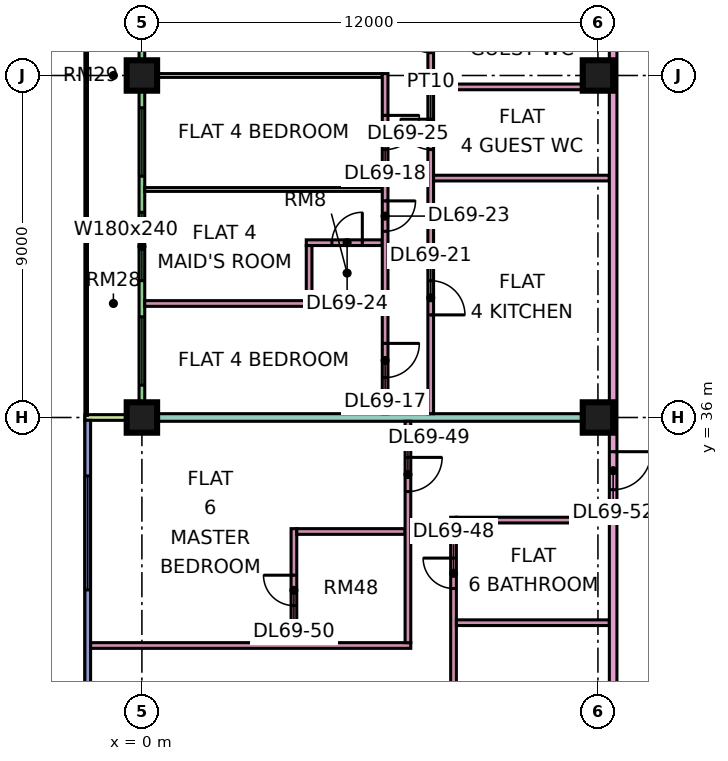
"""IFC4 building model, lengths in metres.
Left out: names, types, materials, properties, quantities, classifications, styles, units other than length and angle.
Written with IfcOpenShell. Run it as: python <this file> out.ifc"""

import sys

from ifc_helpers import new_model, si_unit, direction, frame, frame_2d, origin, origin_2d, place, context, subcontext, project, spatial, rectangle, extrude, element, fill, save


model = new_model("IFC4")
c1 = context("Model", 3, precision=1e-05, world=origin(), true_north=direction((0.0, 1.0)))
c2 = subcontext(c1, "Body", "Model", "MODEL_VIEW")
j1 = project(units=[si_unit("LENGTHUNIT", "METRE"), si_unit("PLANEANGLEUNIT", "RADIAN")], contexts=[c1])
p1 = place(None, origin())
s1 = spatial("IfcSite", under=j1, at=p1, CompositionType="ELEMENT")
p2 = place(p1, origin())
s2 = spatial("IfcBuilding", under=s1, at=p2, CompositionType="ELEMENT")
p3 = place(p2, frame((0.0, 0.0, 295.9)))
s3 = spatial("IfcBuildingStorey", under=s2, at=p3, CompositionType="ELEMENT", Elevation=295.9)
p4 = place(p3, frame((0.0, 36.0, 0.0), z_axis=(0.0, 0.0, 1.0), x_axis=(1.0, 0.0, 0.0)))
e1 = element("IfcColumn", 1, at=p4, inside=s3, PredefinedType="COLUMN", context=c2, shape_type="SweptSolid", body=[
    extrude(rectangle(XDim=0.8, YDim=0.8, at=origin_2d()), origin(), (0.0, 0.0, 1.0), 3.75),
])
for number, where, z_axis, x_axis in (
    (2, (0.0, 45.0, 0.0), (0.0, 0.0, 1.0), (1.0, 0.0, 0.0)),
    (3, (12.0, 36.0, 0.0), (0.0, 0.0, 1.0), (1.0, 0.0, 0.0)),
    (4, (12.0, 45.0, 0.0), (0.0, 0.0, 1.0), (1.0, 0.0, 0.0)),
):
    element("IfcColumn", number, at=place(p3, frame(where, z_axis=z_axis, x_axis=x_axis)), inside=s3, PredefinedType="COLUMN", context=c2, shape_type="SweptSolid", body=[
        extrude(rectangle(XDim=0.8, YDim=0.8, at=origin_2d()), origin(), (0.0, 0.0, 1.0), 3.75),
    ])
p5 = place(p3, frame((0.0, 47.925, 0.0), z_axis=(0.0, 0.0, 1.0), x_axis=(0.0, -1.0, 0.0)))
e5 = element("IfcWall", 5, at=p5, inside=s3, PredefinedType="SOLIDWALL", context=c2, shape_type="SweptSolid", body=[
    extrude(rectangle(XDim=11.85, YDim=0.15, at=frame_2d((5.925, 0.0))), origin(), (0.0, 0.0, 1.0), 3.35),
])
p6 = place(p5, frame((0.613, 0.0, 0.0)))
e6 = element("IfcOpeningElement", 6, at=p6, cuts=e5, PredefinedType="OPENING", context=c2, shape_type="SweptSolid", body=[
    extrude(rectangle(XDim=1.2, YDim=2.4, at=frame_2d((0.6, 1.2))), frame((0.0, 0.085, 0.0), z_axis=(0.0, -1.0, 0.0), x_axis=(1.0, 0.0, 0.0)), (0.0, 0.0, 1.0), 0.17),
])
p7 = place(p5, frame((3.775, 0.0, 0.45)))
e7 = element("IfcOpeningElement", 7, at=p7, cuts=e5, PredefinedType="OPENING", context=c2, shape_type="SweptSolid", body=[
    extrude(rectangle(XDim=1.8, YDim=2.4, at=frame_2d((0.9, 1.2))), frame((0.0, 0.085, 0.0), z_axis=(0.0, -1.0, 0.0), x_axis=(1.0, 0.0, 0.0)), (0.0, 0.0, 1.0), 0.17),
])
p8 = place(p5, frame((6.525, 0.0, 0.45)))
e8 = element("IfcOpeningElement", 8, at=p8, cuts=e5, PredefinedType="OPENING", context=c2, shape_type="SweptSolid", body=[
    extrude(rectangle(XDim=1.8, YDim=2.4, at=frame_2d((0.9, 1.2))), frame((0.0, 0.085, 0.0), z_axis=(0.0, -1.0, 0.0), x_axis=(1.0, 0.0, 0.0)), (0.0, 0.0, 1.0), 0.17),
])
p9 = place(p5, frame((9.275, 0.0, 0.45)))
e9 = element("IfcOpeningElement", 9, at=p9, cuts=e5, PredefinedType="OPENING", context=c2, shape_type="SweptSolid", body=[
    extrude(rectangle(XDim=1.8, YDim=2.4, at=frame_2d((0.9, 1.2))), frame((0.0, 0.085, 0.0), z_axis=(0.0, -1.0, 0.0), x_axis=(1.0, 0.0, 0.0)), (0.0, 0.0, 1.0), 0.17),
])
p10 = place(p3, frame((-1.5, 36.0, 0.0), z_axis=(0.0, 0.0, 1.0), x_axis=(1.0, 0.0, 0.0)))
e10 = element("IfcWall", 10, at=p10, inside=s3, PredefinedType="SOLIDWALL", context=c2, shape_type="SweptSolid", body=[
    extrude(rectangle(XDim=1.5, YDim=0.15, at=frame_2d((0.75, 0.0))), origin(), (0.0, 0.0, 1.0), 3.35),
])
p11 = place(p3, frame((-1.425, 35.925, 0.0), z_axis=(0.0, 0.0, 1.0), x_axis=(0.0, -1.0, 0.0)))
e11 = element("IfcWall", 11, at=p11, inside=s3, PredefinedType="SOLIDWALL", context=c2, shape_type="SweptSolid", body=[
    extrude(rectangle(XDim=11.85, YDim=0.15, at=frame_2d((5.925, 0.0))), origin(), (0.0, 0.0, 1.0), 3.35),
])
p12 = place(p11, frame((1.462, 0.0, 0.45)))
e12 = element("IfcOpeningElement", 12, at=p12, cuts=e11, PredefinedType="OPENING", context=c2, shape_type="SweptSolid", body=[
    extrude(rectangle(XDim=3.0, YDim=2.4, at=frame_2d((1.5, 1.2))), frame((0.0, 0.085, 0.0), z_axis=(0.0, -1.0, 0.0), x_axis=(1.0, 0.0, 0.0)), (0.0, 0.0, 1.0), 0.17),
])
p13 = place(p11, frame((7.387, 0.0, 0.45)))
e13 = element("IfcOpeningElement", 13, at=p13, cuts=e11, PredefinedType="OPENING", context=c2, shape_type="SweptSolid", body=[
    extrude(rectangle(XDim=3.0, YDim=2.4, at=frame_2d((1.5, 1.2))), frame((0.0, 0.085, 0.0), z_axis=(0.0, -1.0, 0.0), x_axis=(1.0, 0.0, 0.0)), (0.0, 0.0, 1.0), 0.17),
])
p14 = place(p3, frame((-1.35, 30.0, 0.0), z_axis=(0.0, 0.0, 1.0), x_axis=(1.0, 0.0, 0.0)))
e14 = element("IfcWall", 14, at=p14, inside=s3, PredefinedType="PARTITIONING", context=c2, shape_type="SweptSolid", body=[
    extrude(rectangle(XDim=8.425, YDim=0.15, at=frame_2d((4.212, 0.0))), origin(), (0.0, 0.0, 1.0), 3.35),
])
e15 = element("IfcWall", 15, at=p4, inside=s3, PredefinedType="PARTITIONING", context=c2, shape_type="SweptSolid", body=[
    extrude(rectangle(XDim=12.3, YDim=0.2, at=frame_2d((6.15, 0.0))), origin(), (0.0, 0.0, 1.0), 3.35),
])
p15 = place(p3, frame((0.074, 39.0, 0.0), z_axis=(0.0, 0.0, 1.0), x_axis=(1.0, 0.0, 0.0)))
e16 = element("IfcWall", 16, at=p15, inside=s3, PredefinedType="PARTITIONING", context=c2, shape_type="SweptSolid", body=[
    extrude(rectangle(XDim=6.251, YDim=0.15, at=frame_2d((3.125, 0.0))), origin(), (0.0, 0.0, 1.0), 3.35),
])
for number, where, z_axis, x_axis in (
    (17, (0.074, 42.0, 0.0), (0.0, 0.0, 1.0), (1.0, 0.0, 0.0)),
    (18, (0.074, 45.0, 0.0), (0.0, 0.0, 1.0), (1.0, 0.0, 0.0)),
):
    element("IfcWall", number, at=place(p3, frame(where, z_axis=z_axis, x_axis=x_axis)), inside=s3, PredefinedType="PARTITIONING", context=c2, shape_type="SweptSolid", body=[
        extrude(rectangle(XDim=6.251, YDim=0.1, at=frame_2d((3.125, 0.0))), origin(), (0.0, 0.0, 1.0), 3.35),
    ])
p16 = place(p3, frame((4.0, 30.075, 0.0), z_axis=(0.0, 0.0, 1.0), x_axis=(0.0, 1.0, 0.0)))
e19 = element("IfcWall", 19, at=p16, inside=s3, PredefinedType="PARTITIONING", context=c2, shape_type="SweptSolid", body=[
    extrude(rectangle(XDim=3.0, YDim=0.15, at=frame_2d((1.5, 0.0))), origin(), (0.0, 0.0, 1.0), 3.35),
])
p17 = place(p16, frame((0.975, 0.0, 0.0)))
e20 = element("IfcOpeningElement", 20, at=p17, cuts=e19, PredefinedType="OPENING", context=c2, shape_type="SweptSolid", body=[
    extrude(rectangle(XDim=0.8, YDim=2.1, at=frame_2d((0.4, 1.05))), frame((0.0, 0.085, 0.0), z_axis=(0.0, -1.0, 0.0), x_axis=(1.0, 0.0, 0.0)), (0.0, 0.0, 1.0), 0.17),
])
p18 = place(p3, frame((4.075, 33.0, 0.0), z_axis=(0.0, 0.0, 1.0), x_axis=(1.0, 0.0, 0.0)))
e21 = element("IfcWall", 21, at=p18, inside=s3, PredefinedType="PARTITIONING", context=c2, shape_type="SweptSolid", body=[
    extrude(rectangle(XDim=2.85, YDim=0.15, at=frame_2d((1.425, 0.0))), origin(), (0.0, 0.0, 1.0), 3.35),
])
p19 = place(p3, frame((4.325, 40.6, 0.0), z_axis=(0.0, 0.0, 1.0), x_axis=(1.0, 0.0, 0.0)))
e22 = element("IfcWall", 22, at=p19, inside=s3, PredefinedType="PARTITIONING", context=c2, shape_type="SweptSolid", body=[
    extrude(rectangle(XDim=2.0, YDim=0.15, at=frame_2d((1.0, 0.0))), origin(), (0.0, 0.0, 1.0), 3.35),
])
p20 = place(p19, frame((0.675, 0.0, 0.0)))
e23 = element("IfcOpeningElement", 23, at=p20, cuts=e22, PredefinedType="OPENING", context=c2, shape_type="SweptSolid", body=[
    extrude(rectangle(XDim=0.8, YDim=2.1, at=frame_2d((0.4, 1.05))), frame((0.0, 0.085, 0.0), z_axis=(0.0, -1.0, 0.0), x_axis=(1.0, 0.0, 0.0)), (0.0, 0.0, 1.0), 0.17),
])
p21 = place(p3, frame((4.4, 39.075, 0.0), z_axis=(0.0, 0.0, 1.0), x_axis=(0.0, 1.0, 0.0)))
e24 = element("IfcWall", 24, at=p21, inside=s3, PredefinedType="PARTITIONING", context=c2, shape_type="SweptSolid", body=[
    extrude(rectangle(XDim=1.45, YDim=0.15, at=frame_2d((0.725, 0.0))), origin(), (0.0, 0.0, 1.0), 3.35),
])
p22 = place(p3, frame((6.4, 36.1, 0.0), z_axis=(0.0, 0.0, 1.0), x_axis=(0.0, 1.0, 0.0)))
e25 = element("IfcWall", 25, at=p22, inside=s3, PredefinedType="PARTITIONING", context=c2, shape_type="SweptSolid", body=[
    extrude(rectangle(XDim=8.95, YDim=0.15, at=frame_2d((4.475, 0.0))), origin(), (0.0, 0.0, 1.0), 3.35),
])
p23 = place(p22, frame((0.95, 0.0, 0.0)))
e26 = element("IfcOpeningElement", 26, at=p23, cuts=e25, PredefinedType="OPENING", context=c2, shape_type="SweptSolid", body=[
    extrude(rectangle(XDim=0.9, YDim=2.1, at=frame_2d((0.45, 1.05))), frame((0.0, 0.085, 0.0), z_axis=(0.0, -1.0, 0.0), x_axis=(1.0, 0.0, 0.0)), (0.0, 0.0, 1.0), 0.17),
])
p24 = place(p22, frame((6.95, 0.0, 0.0)))
e27 = element("IfcOpeningElement", 27, at=p24, cuts=e25, PredefinedType="OPENING", context=c2, shape_type="SweptSolid", body=[
    extrude(rectangle(XDim=0.9, YDim=2.1, at=frame_2d((0.45, 1.05))), frame((0.0, 0.085, 0.0), z_axis=(0.0, -1.0, 0.0), x_axis=(1.0, 0.0, 0.0)), (0.0, 0.0, 1.0), 0.17),
])
p25 = place(p22, frame((4.8, 0.0, 0.0)))
e28 = element("IfcOpeningElement", 28, at=p25, cuts=e25, PredefinedType="OPENING", context=c2, shape_type="SweptSolid", body=[
    extrude(rectangle(XDim=0.8, YDim=2.1, at=frame_2d((0.4, 1.05))), frame((0.0, 0.085, 0.0), z_axis=(0.0, -1.0, 0.0), x_axis=(1.0, 0.0, 0.0)), (0.0, 0.0, 1.0), 0.17),
])
p26 = place(p3, frame((7.0, 30.075, 0.0), z_axis=(0.0, 0.0, 1.0), x_axis=(0.0, 1.0, 0.0)))
e29 = element("IfcWall", 29, at=p26, inside=s3, PredefinedType="PARTITIONING", context=c2, shape_type="SweptSolid", body=[
    extrude(rectangle(XDim=5.825, YDim=0.15, at=frame_2d((2.913, 0.0))), origin(), (0.0, 0.0, 1.0), 3.35),
])
p27 = place(p26, frame((3.975, 0.0, 0.0)))
e30 = element("IfcOpeningElement", 30, at=p27, cuts=e29, PredefinedType="OPENING", context=c2, shape_type="SweptSolid", body=[
    extrude(rectangle(XDim=0.9, YDim=2.1, at=frame_2d((0.45, 1.05))), frame((0.0, 0.085, 0.0), z_axis=(0.0, -1.0, 0.0), x_axis=(1.0, 0.0, 0.0)), (0.0, 0.0, 1.0), 0.17),
])
p28 = place(p3, frame((7.6, 36.1, 0.0), z_axis=(0.0, 0.0, 1.0), x_axis=(0.0, 1.0, 0.0)))
e31 = element("IfcWall", 31, at=p28, inside=s3, PredefinedType="PARTITIONING", context=c2, shape_type="SweptSolid", body=[
    extrude(rectangle(XDim=15.275, YDim=0.15, at=frame_2d((7.637, 0.0))), origin(), (0.0, 0.0, 1.0), 3.35),
])
p29 = place(p28, frame((12.8, 0.0, 0.0)))
e32 = element("IfcOpeningElement", 32, at=p29, cuts=e31, PredefinedType="OPENING", context=c2, shape_type="SweptSolid", body=[
    extrude(rectangle(XDim=0.8, YDim=2.1, at=frame_2d((0.4, 1.05))), frame((0.0, 0.085, 0.0), z_axis=(0.0, -1.0, 0.0), x_axis=(1.0, 0.0, 0.0)), (0.0, 0.0, 1.0), 0.17),
])
p30 = place(p28, frame((2.6, 0.0, 0.0)))
e33 = element("IfcOpeningElement", 33, at=p30, cuts=e31, PredefinedType="OPENING", context=c2, shape_type="SweptSolid", body=[
    extrude(rectangle(XDim=0.9, YDim=2.1, at=frame_2d((0.45, 1.05))), frame((0.0, 0.085, 0.0), z_axis=(0.0, -1.0, 0.0), x_axis=(1.0, 0.0, 0.0)), (0.0, 0.0, 1.0), 0.17),
])
p31 = place(p28, frame((6.95, 0.0, 0.0)))
e34 = element("IfcOpeningElement", 34, at=p31, cuts=e31, PredefinedType="OPENING", context=c2, shape_type="SweptSolid", body=[
    extrude(rectangle(XDim=0.8, YDim=2.1, at=frame_2d((0.4, 1.05))), frame((0.0, 0.085, 0.0), z_axis=(0.0, -1.0, 0.0), x_axis=(1.0, 0.0, 0.0)), (0.0, 0.0, 1.0), 0.17),
])
p32 = place(p28, frame((9.5, 0.0, 0.0)))
e35 = element("IfcOpeningElement", 35, at=p32, cuts=e31, PredefinedType="OPENING", context=c2, shape_type="SweptSolid", body=[
    extrude(rectangle(XDim=0.8, YDim=2.1, at=frame_2d((0.4, 1.05))), frame((0.0, 0.085, 0.0), z_axis=(0.0, -1.0, 0.0), x_axis=(1.0, 0.0, 0.0)), (0.0, 0.0, 1.0), 0.17),
])
for number, where, z_axis, x_axis in (
    (36, (7.675, 42.3, 0.0), (0.0, 0.0, 1.0), (1.0, 0.0, 0.0)),
    (37, (7.675, 44.7, 0.0), (0.0, 0.0, 1.0), (1.0, 0.0, 0.0)),
):
    element("IfcWall", number, at=place(p3, frame(where, z_axis=z_axis, x_axis=x_axis)), inside=s3, PredefinedType="PARTITIONING", context=c2, shape_type="SweptSolid", body=[
        extrude(rectangle(XDim=4.625, YDim=0.15, at=frame_2d((2.312, 0.0))), origin(), (0.0, 0.0, 1.0), 3.35),
    ])
p33 = place(p3, frame((8.2, 22.5, 0.0), z_axis=(0.0, 0.0, 1.0), x_axis=(0.0, 1.0, 0.0)))
e38 = element("IfcWall", 38, at=p33, inside=s3, PredefinedType="PARTITIONING", context=c2, shape_type="SweptSolid", body=[
    extrude(rectangle(XDim=10.875, YDim=0.15, at=frame_2d((5.438, 0.0))), origin(), (0.0, 0.0, 1.0), 3.35),
])
p34 = place(p33, frame((9.0, 0.0, 0.0)))
e39 = element("IfcOpeningElement", 39, at=p34, cuts=e38, PredefinedType="OPENING", context=c2, shape_type="SweptSolid", body=[
    extrude(rectangle(XDim=0.8, YDim=2.1, at=frame_2d((0.4, 1.05))), frame((0.0, 0.085, 0.0), z_axis=(0.0, -1.0, 0.0), x_axis=(1.0, 0.0, 0.0)), (0.0, 0.0, 1.0), 0.17),
])
p35 = place(p33, frame((3.5, 0.0, 0.0)))
e40 = element("IfcOpeningElement", 40, at=p35, cuts=e38, PredefinedType="OPENING", context=c2, shape_type="SweptSolid", body=[
    extrude(rectangle(XDim=0.9, YDim=2.1, at=frame_2d((0.45, 1.05))), frame((0.0, 0.085, 0.0), z_axis=(0.0, -1.0, 0.0), x_axis=(1.0, 0.0, 0.0)), (0.0, 0.0, 1.0), 0.17),
])
for number, where, z_axis, x_axis in (
    (41, (8.275, 30.6, 0.0), (0.0, 0.0, 1.0), (1.0, 0.0, 0.0)),
    (42, (8.275, 33.3, 0.0), (0.0, 0.0, 1.0), (1.0, 0.0, 0.0)),
):
    element("IfcWall", number, at=place(p3, frame(where, z_axis=z_axis, x_axis=x_axis)), inside=s3, PredefinedType="PARTITIONING", context=c2, shape_type="SweptSolid", body=[
        extrude(rectangle(XDim=4.025, YDim=0.15, at=frame_2d((2.013, 0.0))), origin(), (0.0, 0.0, 1.0), 3.35),
    ])
p36 = place(p3, frame((12.4, 20.0, 0.0), z_axis=(0.0, 0.0, 1.0), x_axis=(0.0, 1.0, 0.0)))
e43 = element("IfcWall", 43, at=p36, inside=s3, PredefinedType="PARTITIONING", context=c2, shape_type="SweptSolid", body=[
    extrude(rectangle(XDim=33.926, YDim=0.2, at=frame_2d((16.963, 0.0))), origin(), (0.0, 0.0, 1.0), 3.35),
])
p37 = place(p36, frame((32.1, 0.0, 0.0)))
e44 = element("IfcOpeningElement", 44, at=p37, cuts=e43, PredefinedType="OPENING", context=c2, shape_type="SweptSolid", body=[
    extrude(rectangle(XDim=1.0, YDim=2.1, at=frame_2d((0.5, 1.05))), frame((0.0, 0.11, 0.0), z_axis=(0.0, -1.0, 0.0), x_axis=(1.0, 0.0, 0.0)), (0.0, 0.0, 1.0), 0.22),
])
p38 = place(p36, frame((0.6, 0.0, 0.0)))
e45 = element("IfcOpeningElement", 45, at=p38, cuts=e43, PredefinedType="OPENING", context=c2, shape_type="SweptSolid", body=[
    extrude(rectangle(XDim=1.2, YDim=2.1, at=frame_2d((0.6, 1.05))), frame((0.0, 0.11, 0.0), z_axis=(0.0, -1.0, 0.0), x_axis=(1.0, 0.0, 0.0)), (0.0, 0.0, 1.0), 0.22),
])
p39 = place(p36, frame((14.1, 0.0, 0.0)))
e46 = element("IfcOpeningElement", 46, at=p39, cuts=e43, PredefinedType="OPENING", context=c2, shape_type="SweptSolid", body=[
    extrude(rectangle(XDim=1.0, YDim=2.1, at=frame_2d((0.5, 1.05))), frame((0.0, 0.11, 0.0), z_axis=(0.0, -1.0, 0.0), x_axis=(1.0, 0.0, 0.0)), (0.0, 0.0, 1.0), 0.22),
])
p40 = place(p7, origin())
e47 = element("IfcWindow", 47, at=p40, inside=s3, PartitioningType="SINGLE_PANEL", PredefinedType="WINDOW", context=c2, shape_type="SweptSolid", body=[
    extrude(rectangle(XDim=1.8, YDim=2.4, at=frame_2d((0.9, 1.2))), frame((0.0, 0.03, 0.0), z_axis=(0.0, -1.0, 0.0), x_axis=(1.0, 0.0, 0.0)), (0.0, 0.0, 1.0), 0.06),
])
fill(e7, e47)
p41 = place(p8, origin())
e48 = element("IfcWindow", 48, at=p41, inside=s3, PartitioningType="SINGLE_PANEL", PredefinedType="WINDOW", context=c2, shape_type="SweptSolid", body=[
    extrude(rectangle(XDim=1.8, YDim=2.4, at=frame_2d((0.9, 1.2))), frame((0.0, 0.03, 0.0), z_axis=(0.0, -1.0, 0.0), x_axis=(1.0, 0.0, 0.0)), (0.0, 0.0, 1.0), 0.06),
])
fill(e8, e48)
p42 = place(p9, origin())
e49 = element("IfcWindow", 49, at=p42, inside=s3, PartitioningType="SINGLE_PANEL", PredefinedType="WINDOW", context=c2, shape_type="SweptSolid", body=[
    extrude(rectangle(XDim=1.8, YDim=2.4, at=frame_2d((0.9, 1.2))), frame((0.0, 0.03, 0.0), z_axis=(0.0, -1.0, 0.0), x_axis=(1.0, 0.0, 0.0)), (0.0, 0.0, 1.0), 0.06),
])
fill(e9, e49)
p43 = place(p12, origin())
e50 = element("IfcWindow", 50, at=p43, inside=s3, PartitioningType="SINGLE_PANEL", PredefinedType="WINDOW", context=c2, shape_type="SweptSolid", body=[
    extrude(rectangle(XDim=3.0, YDim=2.4, at=frame_2d((1.5, 1.2))), frame((0.0, 0.03, 0.0), z_axis=(0.0, -1.0, 0.0), x_axis=(1.0, 0.0, 0.0)), (0.0, 0.0, 1.0), 0.06),
])
fill(e12, e50)
p44 = place(p23, origin())
e51 = element("IfcDoor", 51, at=p44, inside=s3, OperationType="SINGLE_SWING_RIGHT", PredefinedType="DOOR", context=c2, shape_type="SweptSolid", body=[
    extrude(rectangle(XDim=0.9, YDim=2.1, at=frame_2d((0.45, 1.05))), frame((0.0, 0.025, 0.0), z_axis=(0.0, -1.0, 0.0), x_axis=(1.0, 0.0, 0.0)), (0.0, 0.0, 1.0), 0.05),
])
fill(e26, e51)
p45 = place(p24, origin())
e52 = element("IfcDoor", 52, at=p45, inside=s3, OperationType="SINGLE_SWING_RIGHT", PredefinedType="DOOR", context=c2, shape_type="SweptSolid", body=[
    extrude(rectangle(XDim=0.9, YDim=2.1, at=frame_2d((0.45, 1.05))), frame((0.0, 0.025, 0.0), z_axis=(0.0, -1.0, 0.0), x_axis=(1.0, 0.0, 0.0)), (0.0, 0.0, 1.0), 0.05),
])
fill(e27, e52)
p46 = place(p30, frame((0.9, 0.0, 0.0), z_axis=(0.0, 0.0, 1.0), x_axis=(-1.0, 0.0, 0.0)))
e53 = element("IfcDoor", 53, at=p46, inside=s3, OperationType="SINGLE_SWING_LEFT", PredefinedType="DOOR", context=c2, shape_type="SweptSolid", body=[
    extrude(rectangle(XDim=0.9, YDim=2.1, at=frame_2d((0.45, 1.05))), frame((0.0, 0.025, 0.0), z_axis=(0.0, -1.0, 0.0), x_axis=(1.0, 0.0, 0.0)), (0.0, 0.0, 1.0), 0.05),
])
fill(e33, e53)
p47 = place(p25, origin())
e54 = element("IfcDoor", 54, at=p47, inside=s3, OperationType="SINGLE_SWING_RIGHT", PredefinedType="DOOR", context=c2, shape_type="SweptSolid", body=[
    extrude(rectangle(XDim=0.8, YDim=2.1, at=frame_2d((0.4, 1.05))), frame((0.0, 0.025, 0.0), z_axis=(0.0, -1.0, 0.0), x_axis=(1.0, 0.0, 0.0)), (0.0, 0.0, 1.0), 0.05),
])
fill(e28, e54)
p48 = place(p20, frame((0.8, 0.0, 0.0), z_axis=(0.0, 0.0, 1.0), x_axis=(-1.0, 0.0, 0.0)))
e55 = element("IfcDoor", 55, at=p48, inside=s3, OperationType="SINGLE_SWING_RIGHT", PredefinedType="DOOR", context=c2, shape_type="SweptSolid", body=[
    extrude(rectangle(XDim=0.8, YDim=2.1, at=frame_2d((0.4, 1.05))), frame((0.0, 0.025, 0.0), z_axis=(0.0, -1.0, 0.0), x_axis=(1.0, 0.0, 0.0)), (0.0, 0.0, 1.0), 0.05),
])
fill(e23, e55)
p49 = place(p31, frame((0.8, 0.0, 0.0), z_axis=(0.0, 0.0, 1.0), x_axis=(-1.0, 0.0, 0.0)))
e56 = element("IfcDoor", 56, at=p49, inside=s3, OperationType="SINGLE_SWING_RIGHT", PredefinedType="DOOR", context=c2, shape_type="SweptSolid", body=[
    extrude(rectangle(XDim=0.8, YDim=2.1, at=frame_2d((0.4, 1.05))), frame((0.0, 0.025, 0.0), z_axis=(0.0, -1.0, 0.0), x_axis=(1.0, 0.0, 0.0)), (0.0, 0.0, 1.0), 0.05),
])
fill(e34, e56)
p50 = place(p32, frame((0.8, 0.0, 0.0), z_axis=(0.0, 0.0, 1.0), x_axis=(-1.0, 0.0, 0.0)))
e57 = element("IfcDoor", 57, at=p50, inside=s3, OperationType="SINGLE_SWING_RIGHT", PredefinedType="DOOR", context=c2, shape_type="SweptSolid", body=[
    extrude(rectangle(XDim=0.8, YDim=2.1, at=frame_2d((0.4, 1.05))), frame((0.0, 0.025, 0.0), z_axis=(0.0, -1.0, 0.0), x_axis=(1.0, 0.0, 0.0)), (0.0, 0.0, 1.0), 0.05),
])
fill(e35, e57)
p51 = place(p34, frame((0.8, 0.0, 0.0), z_axis=(0.0, 0.0, 1.0), x_axis=(-1.0, 0.0, 0.0)))
e58 = element("IfcDoor", 58, at=p51, inside=s3, OperationType="SINGLE_SWING_RIGHT", PredefinedType="DOOR", context=c2, shape_type="SweptSolid", body=[
    extrude(rectangle(XDim=0.8, YDim=2.1, at=frame_2d((0.4, 1.05))), frame((0.0, 0.025, 0.0), z_axis=(0.0, -1.0, 0.0), x_axis=(1.0, 0.0, 0.0)), (0.0, 0.0, 1.0), 0.05),
])
fill(e39, e58)
p52 = place(p27, origin())
e59 = element("IfcDoor", 59, at=p52, inside=s3, OperationType="SINGLE_SWING_RIGHT", PredefinedType="DOOR", context=c2, shape_type="SweptSolid", body=[
    extrude(rectangle(XDim=0.9, YDim=2.1, at=frame_2d((0.45, 1.05))), frame((0.0, 0.025, 0.0), z_axis=(0.0, -1.0, 0.0), x_axis=(1.0, 0.0, 0.0)), (0.0, 0.0, 1.0), 0.05),
])
fill(e30, e59)
p53 = place(p17, frame((0.8, 0.0, 0.0), z_axis=(0.0, 0.0, 1.0), x_axis=(-1.0, 0.0, 0.0)))
e60 = element("IfcDoor", 60, at=p53, inside=s3, OperationType="SINGLE_SWING_RIGHT", PredefinedType="DOOR", context=c2, shape_type="SweptSolid", body=[
    extrude(rectangle(XDim=0.8, YDim=2.1, at=frame_2d((0.4, 1.05))), frame((0.0, 0.025, 0.0), z_axis=(0.0, -1.0, 0.0), x_axis=(1.0, 0.0, 0.0)), (0.0, 0.0, 1.0), 0.05),
])
fill(e20, e60)
p54 = place(p39, origin())
e61 = element("IfcDoor", 61, at=p54, inside=s3, OperationType="SINGLE_SWING_RIGHT", PredefinedType="DOOR", context=c2, shape_type="SweptSolid", body=[
    extrude(rectangle(XDim=1.0, YDim=2.1, at=frame_2d((0.5, 1.05))), frame((0.0, 0.025, 0.0), z_axis=(0.0, -1.0, 0.0), x_axis=(1.0, 0.0, 0.0)), (0.0, 0.0, 1.0), 0.05),
])
fill(e46, e61)
save(model, sys.argv[1])
